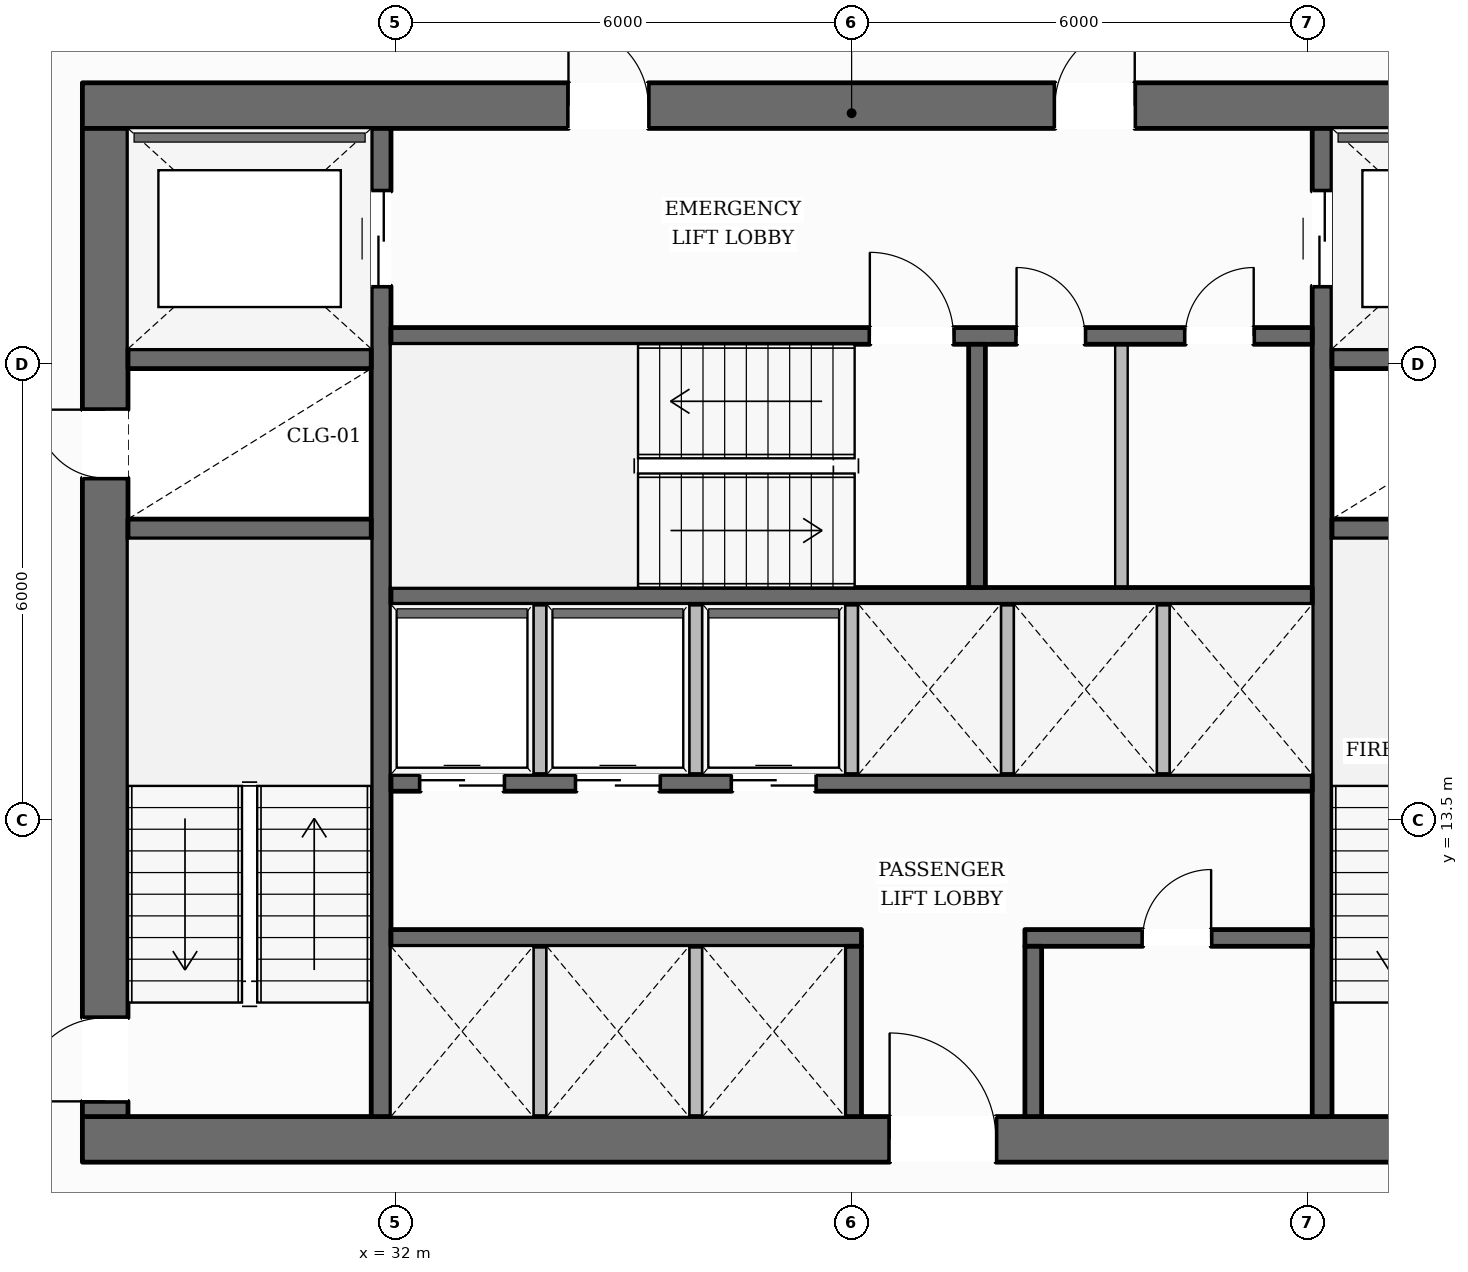
"""IFC4 building model, lengths in metres.
Left out: names, types, materials, properties, quantities, classifications, styles, units other than length and angle.
Written with IfcOpenShell. Run it as: python <this file> out.ifc"""

import sys

from ifc_helpers import new_model, si_unit, direction, frame, frame_2d, origin, place, context, subcontext, project, spatial, rectangle, extrude, element, fill, save


model = new_model("IFC4")
c1 = context("Model", 3, precision=1e-05, world=origin(), true_north=direction((0.0, 1.0)))
c2 = subcontext(c1, "Body", "Model", "MODEL_VIEW")
j1 = project(units=[si_unit("LENGTHUNIT", "METRE"), si_unit("PLANEANGLEUNIT", "RADIAN")], contexts=[c1])
p1 = place(None, origin())
s1 = spatial("IfcSite", under=j1, at=p1, CompositionType="ELEMENT")
p2 = place(p1, origin())
s2 = spatial("IfcBuilding", under=s1, at=p2, CompositionType="ELEMENT")
p3 = place(p2, frame((0.0, 0.0, 56.05)))
s3 = spatial("IfcBuildingStorey", under=s2, at=p3, CompositionType="ELEMENT", Elevation=56.05)
p4 = place(p3, frame((27.88, 9.3, 0.0), z_axis=(0.0, 0.0, 1.0), x_axis=(1.0, 0.0, 0.0)))
e1 = element("IfcWall", 1, at=p4, inside=s3, PredefinedType="SOLIDWALL", context=c2, shape_type="SweptSolid", body=[
    extrude(rectangle(XDim=20.24, YDim=0.6, at=frame_2d((10.12, 0.0))), origin(), (0.0, 0.0, 1.0), 3.59),
])
p5 = place(p4, frame((10.62, 0.0, 0.0)))
e2 = element("IfcOpeningElement", 2, at=p5, cuts=e1, PredefinedType="OPENING", context=c2, shape_type="SweptSolid", body=[
    extrude(rectangle(XDim=1.4, YDim=2.2, at=frame_2d((0.7, 1.1))), frame((0.0, 0.31, 0.0), z_axis=(0.0, -1.0, 0.0), x_axis=(1.0, 0.0, 0.0)), (0.0, 0.0, 1.0), 0.62),
])
p6 = place(p3, frame((27.88, 22.9, 0.0), z_axis=(0.0, 0.0, 1.0), x_axis=(1.0, 0.0, 0.0)))
e3 = element("IfcWall", 3, at=p6, inside=s3, PredefinedType="SOLIDWALL", context=c2, shape_type="SweptSolid", body=[
    extrude(rectangle(XDim=20.24, YDim=0.6, at=frame_2d((10.12, 0.0))), origin(), (0.0, 0.0, 1.0), 3.59),
])
p7 = place(p6, frame((6.395, 0.0, 0.0)))
e4 = element("IfcOpeningElement", 4, at=p7, cuts=e3, PredefinedType="OPENING", context=c2, shape_type="SweptSolid", body=[
    extrude(rectangle(XDim=1.05, YDim=2.15, at=frame_2d((0.525, 1.075))), frame((0.0, 0.31, 0.0), z_axis=(0.0, -1.0, 0.0), x_axis=(1.0, 0.0, 0.0)), (0.0, 0.0, 1.0), 0.62),
])
p8 = place(p6, frame((12.795, 0.0, 0.0)))
e5 = element("IfcOpeningElement", 5, at=p8, cuts=e3, PredefinedType="OPENING", context=c2, shape_type="SweptSolid", body=[
    extrude(rectangle(XDim=1.05, YDim=2.15, at=frame_2d((0.525, 1.075))), frame((0.0, 0.31, 0.0), z_axis=(0.0, -1.0, 0.0), x_axis=(1.0, 0.0, 0.0)), (0.0, 0.0, 1.0), 0.62),
])
p9 = place(p3, frame((28.18, 9.6, 0.0), z_axis=(0.0, 0.0, 1.0), x_axis=(0.0, 1.0, 0.0)))
e6 = element("IfcWall", 6, at=p9, inside=s3, PredefinedType="SOLIDWALL", context=c2, shape_type="SweptSolid", body=[
    extrude(rectangle(XDim=13.0, YDim=0.6, at=frame_2d((6.5, 0.0))), origin(), (0.0, 0.0, 1.0), 3.59),
])
p10 = place(p9, frame((0.2, 0.0, 0.0)))
e7 = element("IfcOpeningElement", 7, at=p10, cuts=e6, PredefinedType="OPENING", context=c2, shape_type="SweptSolid", body=[
    extrude(rectangle(XDim=1.1, YDim=2.15, at=frame_2d((0.55, 1.075))), frame((0.0, 0.31, 0.0), z_axis=(0.0, -1.0, 0.0), x_axis=(1.0, 0.0, 0.0)), (0.0, 0.0, 1.0), 0.62),
])
p11 = place(p9, frame((8.4, 0.0, 0.0)))
e8 = element("IfcOpeningElement", 8, at=p11, cuts=e6, PredefinedType="OPENING", context=c2, shape_type="SweptSolid", body=[
    extrude(rectangle(XDim=0.9, YDim=2.1, at=frame_2d((0.45, 1.05))), frame((0.0, 0.31, 0.0), z_axis=(0.0, -1.0, 0.0), x_axis=(1.0, 0.0, 0.0)), (0.0, 0.0, 1.0), 0.62),
])
p12 = place(p3, frame((31.81, 9.6, 0.0), z_axis=(0.0, 0.0, 1.0), x_axis=(0.0, 1.0, 0.0)))
e9 = element("IfcWall", 9, at=p12, inside=s3, PredefinedType="SHEAR", context=c2, shape_type="SweptSolid", body=[
    extrude(rectangle(XDim=13.0, YDim=0.26, at=frame_2d((6.5, 0.0))), origin(), (0.0, 0.0, 1.0), 3.59),
])
p13 = place(p12, frame((10.925, 0.0, 0.0)))
e10 = element("IfcOpeningElement", 10, at=p13, cuts=e9, PredefinedType="OPENING", context=c2, shape_type="SweptSolid", body=[
    extrude(rectangle(XDim=1.25, YDim=2.25, at=frame_2d((0.625, 1.125))), frame((0.0, 0.14, 0.0), z_axis=(0.0, -1.0, 0.0), x_axis=(1.0, 0.0, 0.0)), (0.0, 0.0, 1.0), 0.28),
])
p14 = place(p3, frame((44.19, 9.6, 0.0), z_axis=(0.0, 0.0, 1.0), x_axis=(0.0, 1.0, 0.0)))
e11 = element("IfcWall", 11, at=p14, inside=s3, PredefinedType="SHEAR", context=c2, shape_type="SweptSolid", body=[
    extrude(rectangle(XDim=13.0, YDim=0.26, at=frame_2d((6.5, 0.0))), origin(), (0.0, 0.0, 1.0), 3.59),
])
p15 = place(p14, frame((10.925, 0.0, 0.0)))
e12 = element("IfcOpeningElement", 12, at=p15, cuts=e11, PredefinedType="OPENING", context=c2, shape_type="SweptSolid", body=[
    extrude(rectangle(XDim=1.25, YDim=2.25, at=frame_2d((0.625, 1.125))), frame((0.0, 0.14, 0.0), z_axis=(0.0, -1.0, 0.0), x_axis=(1.0, 0.0, 0.0)), (0.0, 0.0, 1.0), 0.28),
])
for number, where, z_axis, x_axis in (
    (13, (28.48, 17.33, 0.0), (0.0, 0.0, 1.0), (1.0, 0.0, 0.0)),
    (14, (28.48, 19.57, 0.0), (0.0, 0.0, 1.0), (1.0, 0.0, 0.0)),
    (15, (44.32, 17.33, 0.0), (0.0, 0.0, 1.0), (1.0, 0.0, 0.0)),
    (16, (44.32, 19.57, 0.0), (0.0, 0.0, 1.0), (1.0, 0.0, 0.0)),
):
    element("IfcWall", number, at=place(p3, frame(where, z_axis=z_axis, x_axis=x_axis)), inside=s3, PredefinedType="SHEAR", context=c2, shape_type="SweptSolid", body=[
        extrude(rectangle(XDim=3.2, YDim=0.26, at=frame_2d((1.6, 0.0))), origin(), (0.0, 0.0, 1.0), 3.59),
    ])
p16 = place(p3, frame((31.94, 19.87, 0.0), z_axis=(0.0, 0.0, 1.0), x_axis=(1.0, 0.0, 0.0)))
e17 = element("IfcWall", 17, at=p16, inside=s3, PredefinedType="SOLIDWALL", context=c2, shape_type="SweptSolid", body=[
    extrude(rectangle(XDim=12.12, YDim=0.22, at=frame_2d((6.06, 0.0))), origin(), (0.0, 0.0, 1.0), 3.59),
])
p17 = place(p16, frame((6.3, 0.0, 0.0)))
e18 = element("IfcOpeningElement", 18, at=p17, cuts=e17, PredefinedType="OPENING", context=c2, shape_type="SweptSolid", body=[
    extrude(rectangle(XDim=1.1, YDim=2.15, at=frame_2d((0.55, 1.075))), frame((0.0, 0.12, 0.0), z_axis=(0.0, -1.0, 0.0), x_axis=(1.0, 0.0, 0.0)), (0.0, 0.0, 1.0), 0.24),
])
p18 = place(p16, frame((8.23, 0.0, 0.0)))
e19 = element("IfcOpeningElement", 19, at=p18, cuts=e17, PredefinedType="OPENING", context=c2, shape_type="SweptSolid", body=[
    extrude(rectangle(XDim=0.9, YDim=2.1, at=frame_2d((0.45, 1.05))), frame((0.0, 0.12, 0.0), z_axis=(0.0, -1.0, 0.0), x_axis=(1.0, 0.0, 0.0)), (0.0, 0.0, 1.0), 0.24),
])
p19 = place(p16, frame((10.45, 0.0, 0.0)))
e20 = element("IfcOpeningElement", 20, at=p19, cuts=e17, PredefinedType="OPENING", context=c2, shape_type="SweptSolid", body=[
    extrude(rectangle(XDim=0.9, YDim=2.1, at=frame_2d((0.45, 1.05))), frame((0.0, 0.12, 0.0), z_axis=(0.0, -1.0, 0.0), x_axis=(1.0, 0.0, 0.0)), (0.0, 0.0, 1.0), 0.24),
])
p20 = place(p3, frame((31.94, 16.45, 0.0), z_axis=(0.0, 0.0, 1.0), x_axis=(1.0, 0.0, 0.0)))
e21 = element("IfcWall", 21, at=p20, inside=s3, PredefinedType="SOLIDWALL", context=c2, shape_type="SweptSolid", body=[
    extrude(rectangle(XDim=12.12, YDim=0.22, at=frame_2d((6.06, 0.0))), origin(), (0.0, 0.0, 1.0), 3.59),
])
p21 = place(p3, frame((39.65, 16.56, 0.0), z_axis=(0.0, 0.0, 1.0), x_axis=(0.0, 1.0, 0.0)))
e22 = element("IfcWall", 22, at=p21, inside=s3, PredefinedType="SOLIDWALL", context=c2, shape_type="SweptSolid", body=[
    extrude(rectangle(XDim=3.2, YDim=0.22, at=frame_2d((1.6, 0.0))), origin(), (0.0, 0.0, 1.0), 3.59),
])
p22 = place(p3, frame((31.94, 13.99, 0.0), z_axis=(0.0, 0.0, 1.0), x_axis=(1.0, 0.0, 0.0)))
e23 = element("IfcWall", 23, at=p22, inside=s3, PredefinedType="SOLIDWALL", context=c2, shape_type="SweptSolid", body=[
    extrude(rectangle(XDim=12.12, YDim=0.22, at=frame_2d((6.06, 0.0))), origin(), (0.0, 0.0, 1.0), 3.59),
])
p23 = place(p22, frame((0.385, 0.0, 0.0)))
e24 = element("IfcOpeningElement", 24, at=p23, cuts=e23, PredefinedType="OPENING", context=c2, shape_type="SweptSolid", body=[
    extrude(rectangle(XDim=1.1, YDim=2.2, at=frame_2d((0.55, 1.1))), frame((0.0, 0.12, 0.0), z_axis=(0.0, -1.0, 0.0), x_axis=(1.0, 0.0, 0.0)), (0.0, 0.0, 1.0), 0.24),
])
p24 = place(p22, frame((2.435, 0.0, 0.0)))
e25 = element("IfcOpeningElement", 25, at=p24, cuts=e23, PredefinedType="OPENING", context=c2, shape_type="SweptSolid", body=[
    extrude(rectangle(XDim=1.1, YDim=2.2, at=frame_2d((0.55, 1.1))), frame((0.0, 0.12, 0.0), z_axis=(0.0, -1.0, 0.0), x_axis=(1.0, 0.0, 0.0)), (0.0, 0.0, 1.0), 0.24),
])
p25 = place(p22, frame((4.485, 0.0, 0.0)))
e26 = element("IfcOpeningElement", 26, at=p25, cuts=e23, PredefinedType="OPENING", context=c2, shape_type="SweptSolid", body=[
    extrude(rectangle(XDim=1.1, YDim=2.2, at=frame_2d((0.55, 1.1))), frame((0.0, 0.12, 0.0), z_axis=(0.0, -1.0, 0.0), x_axis=(1.0, 0.0, 0.0)), (0.0, 0.0, 1.0), 0.24),
])
p26 = place(p3, frame((31.94, 11.95, 0.0), z_axis=(0.0, 0.0, 1.0), x_axis=(1.0, 0.0, 0.0)))
e27 = element("IfcWall", 27, at=p26, inside=s3, PredefinedType="SOLIDWALL", context=c2, shape_type="SweptSolid", body=[
    extrude(rectangle(XDim=6.19, YDim=0.22, at=frame_2d((3.095, 0.0))), origin(), (0.0, 0.0, 1.0), 3.59),
])
p27 = place(p3, frame((40.28, 11.95, 0.0), z_axis=(0.0, 0.0, 1.0), x_axis=(1.0, 0.0, 0.0)))
e28 = element("IfcWall", 28, at=p27, inside=s3, PredefinedType="SOLIDWALL", context=c2, shape_type="SweptSolid", body=[
    extrude(rectangle(XDim=3.78, YDim=0.22, at=frame_2d((1.89, 0.0))), origin(), (0.0, 0.0, 1.0), 3.59),
])
p28 = place(p27, frame((1.55, 0.0, 0.0)))
e29 = element("IfcOpeningElement", 29, at=p28, cuts=e28, PredefinedType="OPENING", context=c2, shape_type="SweptSolid", body=[
    extrude(rectangle(XDim=0.9, YDim=2.1, at=frame_2d((0.45, 1.05))), frame((0.0, 0.12, 0.0), z_axis=(0.0, -1.0, 0.0), x_axis=(1.0, 0.0, 0.0)), (0.0, 0.0, 1.0), 0.24),
])
for number, where, z_axis, x_axis in (
    (30, (38.02, 9.6, 0.0), (0.0, 0.0, 1.0), (0.0, 1.0, 0.0)),
    (31, (40.39, 9.6, 0.0), (0.0, 0.0, 1.0), (0.0, 1.0, 0.0)),
):
    element("IfcWall", number, at=place(p3, frame(where, z_axis=z_axis, x_axis=x_axis)), inside=s3, PredefinedType="SOLIDWALL", context=c2, shape_type="SweptSolid", body=[
        extrude(rectangle(XDim=2.24, YDim=0.22, at=frame_2d((1.12, 0.0))), origin(), (0.0, 0.0, 1.0), 3.59),
    ])
p29 = place(p3, frame((12.87, 13.823, 0.0), z_axis=(0.0, 0.0, 1.0), x_axis=(0.503276134116, 0.864125646437, 0.0)))
e32 = element("IfcWall", 32, at=p29, inside=s3, PredefinedType="STANDARD", context=c2, shape_type="SweptSolid", body=[
    extrude(rectangle(XDim=35.399, YDim=0.38, at=frame_2d((17.699, 0.0))), origin(), (0.0, 0.0, 1.0), 2.97),
])
p30 = place(p29, frame((8.45, 0.0, 0.0)))
e33 = element("IfcOpeningElement", 33, at=p30, cuts=e32, PredefinedType="OPENING", context=c2, shape_type="SweptSolid", body=[
    extrude(rectangle(XDim=1.0, YDim=2.2, at=frame_2d((0.5, 1.1))), frame((0.0, 0.2, 0.0), z_axis=(0.0, -1.0, 0.0), x_axis=(1.0, 0.0, 0.0)), (0.0, 0.0, 1.0), 0.4),
])
p31 = place(p29, frame((31.227, 0.0, 0.65)))
e34 = element("IfcOpeningElement", 34, at=p31, cuts=e32, PredefinedType="OPENING", context=c2, shape_type="SweptSolid", body=[
    extrude(rectangle(XDim=1.65, YDim=1.75, at=frame_2d((0.825, 0.875))), frame((0.0, 0.2, 0.0), z_axis=(0.0, -1.0, 0.0), x_axis=(1.0, 0.0, 0.0)), (0.0, 0.0, 1.0), 0.4),
])
p32 = place(p29, frame((25.487, 0.0, 0.65)))
e35 = element("IfcOpeningElement", 35, at=p32, cuts=e32, PredefinedType="OPENING", context=c2, shape_type="SweptSolid", body=[
    extrude(rectangle(XDim=1.65, YDim=1.75, at=frame_2d((0.825, 0.875))), frame((0.0, 0.2, 0.0), z_axis=(0.0, -1.0, 0.0), x_axis=(1.0, 0.0, 0.0)), (0.0, 0.0, 1.0), 0.4),
])
p33 = place(p29, frame((19.747, 0.0, 0.65)))
e36 = element("IfcOpeningElement", 36, at=p33, cuts=e32, PredefinedType="OPENING", context=c2, shape_type="SweptSolid", body=[
    extrude(rectangle(XDim=1.65, YDim=1.75, at=frame_2d((0.825, 0.875))), frame((0.0, 0.2, 0.0), z_axis=(0.0, -1.0, 0.0), x_axis=(1.0, 0.0, 0.0)), (0.0, 0.0, 1.0), 0.4),
])
p34 = place(p29, frame((2.525, 0.0, 0.65)))
e37 = element("IfcOpeningElement", 37, at=p34, cuts=e32, PredefinedType="OPENING", context=c2, shape_type="SweptSolid", body=[
    extrude(rectangle(XDim=1.65, YDim=1.75, at=frame_2d((0.825, 0.875))), frame((0.0, 0.2, 0.0), z_axis=(0.0, -1.0, 0.0), x_axis=(1.0, 0.0, 0.0)), (0.0, 0.0, 1.0), 0.4),
])
for number, where, z_axis, x_axis in (
    (38, (33.9, 9.6, 0.0), (0.0, 0.0, 1.0), (0.0, 1.0, 0.0)),
    (39, (35.95, 9.6, 0.0), (0.0, 0.0, 1.0), (0.0, 1.0, 0.0)),
    (40, (33.9, 14.1, 0.0), (0.0, 0.0, 1.0), (0.0, 1.0, 0.0)),
    (41, (35.95, 14.1, 0.0), (0.0, 0.0, 1.0), (0.0, 1.0, 0.0)),
    (42, (38.0, 14.1, 0.0), (0.0, 0.0, 1.0), (0.0, 1.0, 0.0)),
    (43, (40.05, 14.1, 0.0), (0.0, 0.0, 1.0), (0.0, 1.0, 0.0)),
    (44, (42.1, 14.1, 0.0), (0.0, 0.0, 1.0), (0.0, 1.0, 0.0)),
):
    element("IfcWall", number, at=place(p3, frame(where, z_axis=z_axis, x_axis=x_axis)), inside=s3, PredefinedType="PARTITIONING", context=c2, shape_type="SweptSolid", body=[
        extrude(rectangle(XDim=2.24, YDim=0.165, at=frame_2d((1.12, 0.0))), origin(), (0.0, 0.0, 1.0), 3.59),
    ])
p35 = place(p3, frame((41.55, 16.56, 0.0), z_axis=(0.0, 0.0, 1.0), x_axis=(0.0, 1.0, 0.0)))
e45 = element("IfcWall", 45, at=p35, inside=s3, PredefinedType="PARTITIONING", context=c2, shape_type="SweptSolid", body=[
    extrude(rectangle(XDim=3.2, YDim=0.165, at=frame_2d((1.6, 0.0))), origin(), (0.0, 0.0, 1.0), 3.59),
])
p36 = place(p10, origin())
e46 = element("IfcDoor", 46, at=p36, inside=s3, OperationType="SINGLE_SWING_LEFT", PredefinedType="DOOR", context=c2, shape_type="SweptSolid", body=[
    extrude(rectangle(XDim=1.1, YDim=2.15, at=frame_2d((0.55, 1.075))), frame((0.0, 0.025, 0.0), z_axis=(0.0, -1.0, 0.0), x_axis=(1.0, 0.0, 0.0)), (0.0, 0.0, 1.0), 0.05),
])
fill(e7, e46)
p37 = place(p17, origin())
e47 = element("IfcDoor", 47, at=p37, inside=s3, OperationType="SINGLE_SWING_LEFT", PredefinedType="DOOR", context=c2, shape_type="SweptSolid", body=[
    extrude(rectangle(XDim=1.1, YDim=2.15, at=frame_2d((0.55, 1.075))), frame((0.0, 0.025, 0.0), z_axis=(0.0, -1.0, 0.0), x_axis=(1.0, 0.0, 0.0)), (0.0, 0.0, 1.0), 0.05),
])
fill(e18, e47)
p38 = place(p11, origin())
e48 = element("IfcDoor", 48, at=p38, inside=s3, OperationType="SINGLE_SWING_RIGHT", PredefinedType="DOOR", context=c2, shape_type="SweptSolid", body=[
    extrude(rectangle(XDim=0.9, YDim=2.1, at=frame_2d((0.45, 1.05))), frame((0.0, 0.025, 0.0), z_axis=(0.0, -1.0, 0.0), x_axis=(1.0, 0.0, 0.0)), (0.0, 0.0, 1.0), 0.05),
])
fill(e8, e48)
p39 = place(p7, origin())
e49 = element("IfcDoor", 49, at=p39, inside=s3, OperationType="SINGLE_SWING_LEFT", PredefinedType="DOOR", context=c2, shape_type="SweptSolid", body=[
    extrude(rectangle(XDim=1.05, YDim=2.15, at=frame_2d((0.525, 1.075))), frame((0.0, 0.025, 0.0), z_axis=(0.0, -1.0, 0.0), x_axis=(1.0, 0.0, 0.0)), (0.0, 0.0, 1.0), 0.05),
])
fill(e4, e49)
p40 = place(p8, origin())
e50 = element("IfcDoor", 50, at=p40, inside=s3, OperationType="SINGLE_SWING_RIGHT", PredefinedType="DOOR", context=c2, shape_type="SweptSolid", body=[
    extrude(rectangle(XDim=1.05, YDim=2.15, at=frame_2d((0.525, 1.075))), frame((0.0, 0.025, 0.0), z_axis=(0.0, -1.0, 0.0), x_axis=(1.0, 0.0, 0.0)), (0.0, 0.0, 1.0), 0.05),
])
fill(e5, e50)
p41 = place(p13, origin())
e51 = element("IfcDoor", 51, at=p41, inside=s3, OperationType="DOUBLE_DOOR_SLIDING", PredefinedType="DOOR", context=c2, shape_type="SweptSolid", body=[
    extrude(rectangle(XDim=1.25, YDim=2.25, at=frame_2d((0.625, 1.125))), frame((0.0, 0.025, 0.0), z_axis=(0.0, -1.0, 0.0), x_axis=(1.0, 0.0, 0.0)), (0.0, 0.0, 1.0), 0.05),
])
fill(e10, e51)
p42 = place(p15, origin())
e52 = element("IfcDoor", 52, at=p42, inside=s3, OperationType="DOUBLE_DOOR_SLIDING", PredefinedType="DOOR", context=c2, shape_type="SweptSolid", body=[
    extrude(rectangle(XDim=1.25, YDim=2.25, at=frame_2d((0.625, 1.125))), frame((0.0, 0.025, 0.0), z_axis=(0.0, -1.0, 0.0), x_axis=(1.0, 0.0, 0.0)), (0.0, 0.0, 1.0), 0.05),
])
fill(e12, e52)
p43 = place(p5, origin())
e53 = element("IfcDoor", 53, at=p43, inside=s3, OperationType="SINGLE_SWING_LEFT", PredefinedType="DOOR", context=c2, shape_type="SweptSolid", body=[
    extrude(rectangle(XDim=1.4, YDim=2.2, at=frame_2d((0.7, 1.1))), frame((0.0, 0.025, 0.0), z_axis=(0.0, -1.0, 0.0), x_axis=(1.0, 0.0, 0.0)), (0.0, 0.0, 1.0), 0.05),
])
fill(e2, e53)
p44 = place(p23, origin())
e54 = element("IfcDoor", 54, at=p44, inside=s3, OperationType="DOUBLE_DOOR_SLIDING", PredefinedType="DOOR", context=c2, shape_type="SweptSolid", body=[
    extrude(rectangle(XDim=1.1, YDim=2.2, at=frame_2d((0.55, 1.1))), frame((0.0, 0.025, 0.0), z_axis=(0.0, -1.0, 0.0), x_axis=(1.0, 0.0, 0.0)), (0.0, 0.0, 1.0), 0.05),
])
fill(e24, e54)
p45 = place(p24, origin())
e55 = element("IfcDoor", 55, at=p45, inside=s3, OperationType="DOUBLE_DOOR_SLIDING", PredefinedType="DOOR", context=c2, shape_type="SweptSolid", body=[
    extrude(rectangle(XDim=1.1, YDim=2.2, at=frame_2d((0.55, 1.1))), frame((0.0, 0.025, 0.0), z_axis=(0.0, -1.0, 0.0), x_axis=(1.0, 0.0, 0.0)), (0.0, 0.0, 1.0), 0.05),
])
fill(e25, e55)
p46 = place(p25, origin())
e56 = element("IfcDoor", 56, at=p46, inside=s3, OperationType="DOUBLE_DOOR_SLIDING", PredefinedType="DOOR", context=c2, shape_type="SweptSolid", body=[
    extrude(rectangle(XDim=1.1, YDim=2.2, at=frame_2d((0.55, 1.1))), frame((0.0, 0.025, 0.0), z_axis=(0.0, -1.0, 0.0), x_axis=(1.0, 0.0, 0.0)), (0.0, 0.0, 1.0), 0.05),
])
fill(e26, e56)
p47 = place(p18, origin())
e57 = element("IfcDoor", 57, at=p47, inside=s3, OperationType="SINGLE_SWING_LEFT", PredefinedType="DOOR", context=c2, shape_type="SweptSolid", body=[
    extrude(rectangle(XDim=0.9, YDim=2.1, at=frame_2d((0.45, 1.05))), frame((0.0, 0.025, 0.0), z_axis=(0.0, -1.0, 0.0), x_axis=(1.0, 0.0, 0.0)), (0.0, 0.0, 1.0), 0.05),
])
fill(e19, e57)
p48 = place(p19, origin())
e58 = element("IfcDoor", 58, at=p48, inside=s3, OperationType="SINGLE_SWING_RIGHT", PredefinedType="DOOR", context=c2, shape_type="SweptSolid", body=[
    extrude(rectangle(XDim=0.9, YDim=2.1, at=frame_2d((0.45, 1.05))), frame((0.0, 0.025, 0.0), z_axis=(0.0, -1.0, 0.0), x_axis=(1.0, 0.0, 0.0)), (0.0, 0.0, 1.0), 0.05),
])
fill(e20, e58)
p49 = place(p28, origin())
e59 = element("IfcDoor", 59, at=p49, inside=s3, OperationType="SINGLE_SWING_RIGHT", PredefinedType="DOOR", context=c2, shape_type="SweptSolid", body=[
    extrude(rectangle(XDim=0.9, YDim=2.1, at=frame_2d((0.45, 1.05))), frame((0.0, 0.025, 0.0), z_axis=(0.0, -1.0, 0.0), x_axis=(1.0, 0.0, 0.0)), (0.0, 0.0, 1.0), 0.05),
])
fill(e29, e59)
save(model, sys.argv[1])
